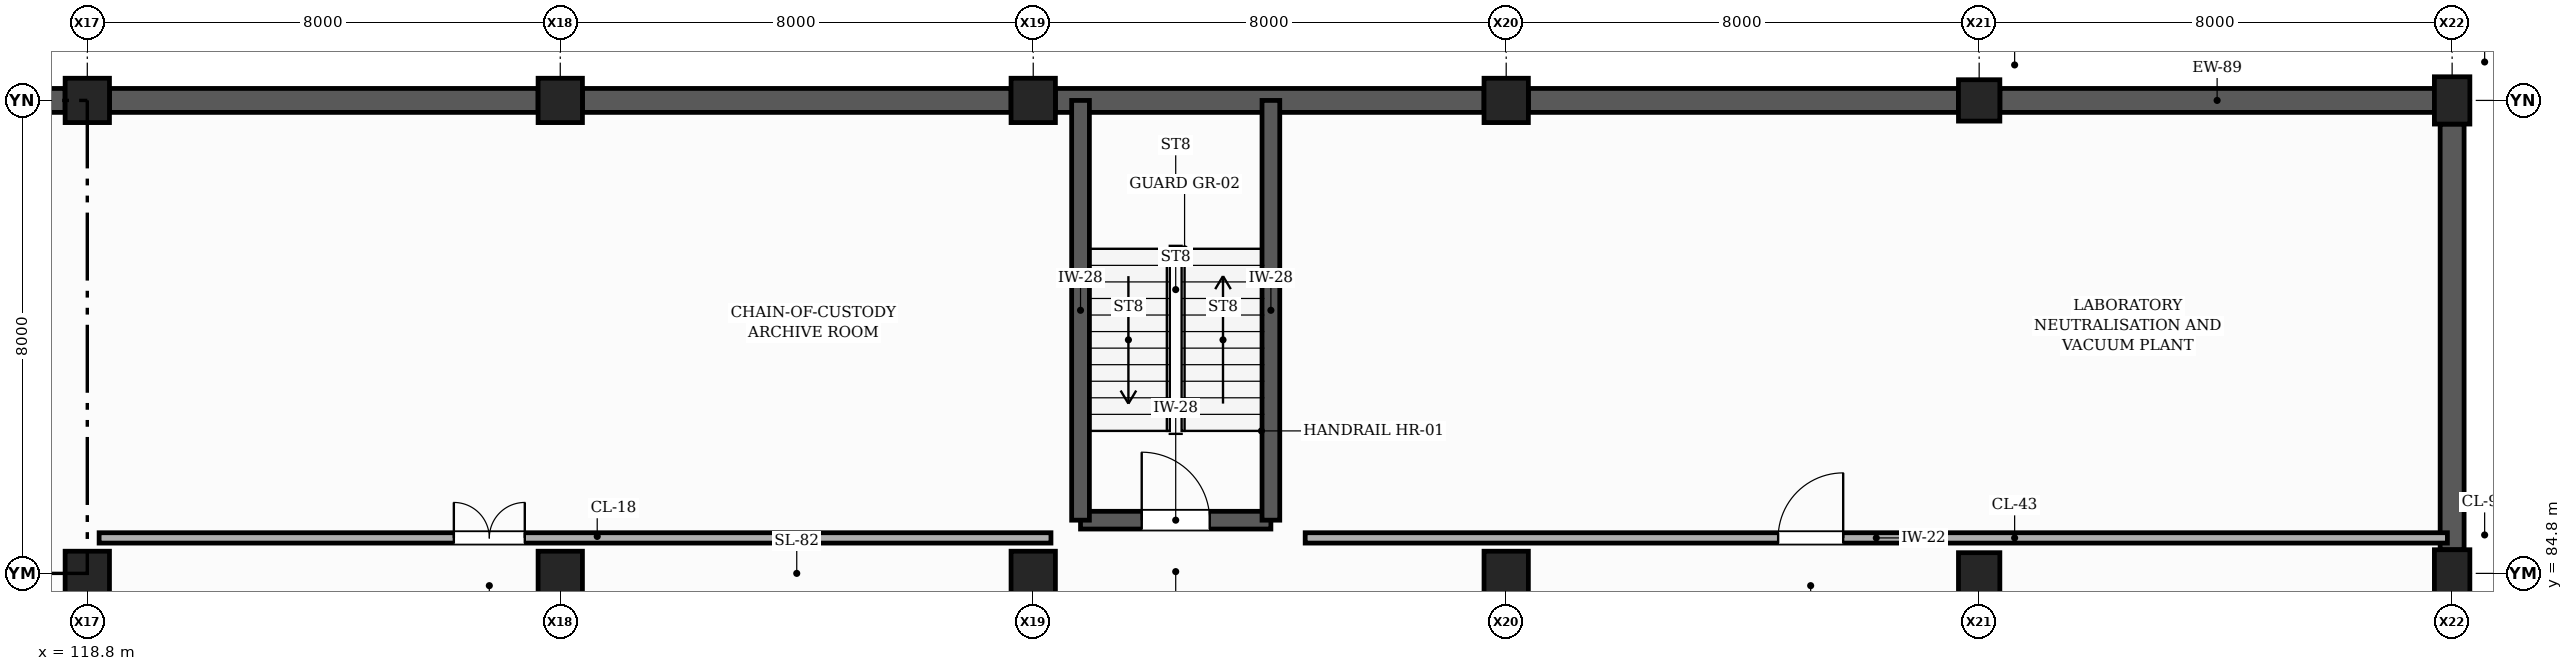
"""IFC4 building model, lengths in metres.
Left out: names, types, materials, properties, quantities, classifications, styles, units other than length and angle.
Written with IfcOpenShell. Run it as: python <this file> out.ifc"""

import sys

from ifc_helpers import new_model, si_unit, direction, frame, frame_2d, origin, origin_2d, place, context, subcontext, project, spatial, rectangle, extrude, element, fill, save


model = new_model("IFC4")
c1 = context("Model", 3, precision=1e-05, world=origin(), true_north=direction((0.0, 1.0)))
c2 = subcontext(c1, "Body", "Model", "MODEL_VIEW")
j1 = project(units=[si_unit("LENGTHUNIT", "METRE"), si_unit("PLANEANGLEUNIT", "RADIAN")], contexts=[c1])
p1 = place(None, origin())
s1 = spatial("IfcSite", under=j1, at=p1, CompositionType="ELEMENT")
p2 = place(p1, origin())
s2 = spatial("IfcBuilding", under=s1, at=p2, CompositionType="ELEMENT")
p3 = place(p2, frame((0.0, 0.0, -4.2)))
s3 = spatial("IfcBuildingStorey", under=s2, at=p3, CompositionType="ELEMENT", Elevation=-4.2)
for number, where, z_axis, x_axis in (
    (1, (118.8, 84.8, -0.52), (0.0, 0.0, 1.0), (1.0, 0.0, 0.0)),
    (2, (118.8, 92.8, -0.52), (0.0, 0.0, 1.0), (1.0, 0.0, 0.0)),
    (3, (126.8, 84.8, -0.52), (0.0, 0.0, 1.0), (1.0, 0.0, 0.0)),
    (4, (126.8, 92.8, -0.52), (0.0, 0.0, 1.0), (1.0, 0.0, 0.0)),
    (5, (134.8, 84.8, -0.52), (0.0, 0.0, 1.0), (1.0, 0.0, 0.0)),
    (6, (134.8, 92.8, -0.52), (0.0, 0.0, 1.0), (1.0, 0.0, 0.0)),
    (7, (142.8, 84.8, -0.52), (0.0, 0.0, 1.0), (1.0, 0.0, 0.0)),
    (8, (142.8, 92.8, -0.52), (0.0, 0.0, 1.0), (1.0, 0.0, 0.0)),
):
    element("IfcColumn", number, at=place(p3, frame(where, z_axis=z_axis, x_axis=x_axis)), inside=s3, PredefinedType="COLUMN", context=c2, shape_type="SweptSolid", body=[
        extrude(rectangle(XDim=0.75, YDim=0.75, at=origin_2d()), origin(), (0.0, 0.0, 1.0), 4.72),
    ])
for number, where, z_axis, x_axis in (
    (9, (150.8, 84.8, -0.52), (0.0, 0.0, 1.0), (1.0, 0.0, 0.0)),
    (10, (150.8, 92.8, -0.52), (0.0, 0.0, 1.0), (1.0, 0.0, 0.0)),
):
    element("IfcColumn", number, at=place(p3, frame(where, z_axis=z_axis, x_axis=x_axis)), inside=s3, PredefinedType="COLUMN", context=c2, shape_type="SweptSolid", body=[
        extrude(rectangle(XDim=0.7, YDim=0.7, at=origin_2d()), origin(), (0.0, 0.0, 1.0), 4.72),
    ])
for number, where, z_axis, x_axis in (
    (11, (158.8, 84.8, -0.52), (0.0, 0.0, 1.0), (1.0, 0.0, 0.0)),
    (12, (158.8, 92.8, -0.52), (0.0, 0.0, 1.0), (1.0, 0.0, 0.0)),
):
    element("IfcColumn", number, at=place(p3, frame(where, z_axis=z_axis, x_axis=x_axis)), inside=s3, PredefinedType="COLUMN", context=c2, shape_type="SweptSolid", body=[
        extrude(rectangle(XDim=0.6, YDim=0.8, at=origin_2d()), origin(), (0.0, 0.0, 1.0), 4.72),
    ])
p4 = place(p3, frame((158.8, 85.2, -0.44), z_axis=(0.0, 0.0, 1.0), x_axis=(0.0, 1.0, 0.0)))
e13 = element("IfcWall", 13, at=p4, inside=s3, PredefinedType="SOLIDWALL", context=c2, shape_type="SweptSolid", body=[
    extrude(rectangle(XDim=7.2, YDim=0.405, at=frame_2d((3.6, 0.0))), origin(), (0.0, 0.0, 1.0), 3.57),
])
p5 = place(p3, frame((158.5, 92.8, -0.44), z_axis=(0.0, 0.0, 1.0), x_axis=(-1.0, 0.0, 0.0)))
e14 = element("IfcWall", 14, at=p5, inside=s3, PredefinedType="SOLIDWALL", context=c2, shape_type="SweptSolid", body=[
    extrude(rectangle(XDim=7.35, YDim=0.405, at=frame_2d((3.675, 0.0))), origin(), (0.0, 0.0, 1.0), 3.47),
])
p6 = place(p3, frame((150.45, 92.8, -0.44), z_axis=(0.0, 0.0, 1.0), x_axis=(-1.0, 0.0, 0.0)))
e15 = element("IfcWall", 15, at=p6, inside=s3, PredefinedType="SOLIDWALL", context=c2, shape_type="SweptSolid", body=[
    extrude(rectangle(XDim=7.275, YDim=0.405, at=frame_2d((3.637, 0.0))), origin(), (0.0, 0.0, 1.0), 3.47),
])
p7 = place(p3, frame((142.425, 92.8, -0.44), z_axis=(0.0, 0.0, 1.0), x_axis=(-1.0, 0.0, 0.0)))
e16 = element("IfcWall", 16, at=p7, inside=s3, PredefinedType="SOLIDWALL", context=c2, shape_type="SweptSolid", body=[
    extrude(rectangle(XDim=7.25, YDim=0.405, at=frame_2d((3.625, 0.0))), origin(), (0.0, 0.0, 1.0), 4.22),
])
for number, where, z_axis, x_axis in (
    (17, (134.425, 92.8, -0.44), (0.0, 0.0, 1.0), (-1.0, 0.0, 0.0)),
    (18, (126.425, 92.8, -0.44), (0.0, 0.0, 1.0), (-1.0, 0.0, 0.0)),
):
    element("IfcWall", number, at=place(p3, frame(where, z_axis=z_axis, x_axis=x_axis)), inside=s3, PredefinedType="SOLIDWALL", context=c2, shape_type="SweptSolid", body=[
        extrude(rectangle(XDim=7.25, YDim=0.405, at=frame_2d((3.625, 0.0))), origin(), (0.0, 0.0, 1.0), 3.47),
    ])
p8 = place(p3, frame((118.425, 92.8, -0.44), z_axis=(0.0, 0.0, 1.0), x_axis=(-1.0, 0.0, 0.0)))
e19 = element("IfcWall", 19, at=p8, inside=s3, PredefinedType="SOLIDWALL", context=c2, shape_type="SweptSolid", body=[
    extrude(rectangle(XDim=7.25, YDim=0.405, at=frame_2d((3.625, 0.0))), origin(), (0.0, 0.0, 1.0), 4.22),
])
p9 = place(p3, frame((135.6, 85.7, -0.52), z_axis=(0.0, 0.0, 1.0), x_axis=(1.0, 0.0, 0.0)))
e20 = element("IfcWall", 20, at=p9, inside=s3, PredefinedType="SHEAR", context=c2, shape_type="SweptSolid", body=[
    extrude(rectangle(XDim=3.22, YDim=0.3, at=frame_2d((1.61, 0.0))), origin(), (0.0, 0.0, 1.0), 4.72),
])
p10 = place(p9, frame((1.035, 0.0, 0.52)))
e21 = element("IfcOpeningElement", 21, at=p10, cuts=e20, PredefinedType="OPENING", context=c2, shape_type="SweptSolid", body=[
    extrude(rectangle(XDim=1.15, YDim=2.15, at=frame_2d((0.575, 1.075))), frame((0.0, 0.16, 0.0), z_axis=(0.0, -1.0, 0.0), x_axis=(1.0, 0.0, 0.0)), (0.0, 0.0, 1.0), 0.32),
])
for number, where, z_axis, x_axis in (
    (22, (138.82, 85.7, -0.52), (0.0, 0.0, 1.0), (0.0, 1.0, 0.0)),
    (23, (135.6, 92.8, -0.52), (0.0, 0.0, 1.0), (0.0, -1.0, 0.0)),
):
    element("IfcWall", number, at=place(p3, frame(where, z_axis=z_axis, x_axis=x_axis)), inside=s3, PredefinedType="SHEAR", context=c2, shape_type="SweptSolid", body=[
        extrude(rectangle(XDim=7.1, YDim=0.3, at=frame_2d((3.55, 0.0))), origin(), (0.0, 0.0, 1.0), 4.72),
    ])
p11 = place(p3, frame((119.0, 85.4, 0.0), z_axis=(0.0, 0.0, 1.0), x_axis=(1.0, 0.0, 0.0)))
e24 = element("IfcWall", 24, at=p11, inside=s3, PredefinedType="PARTITIONING", context=c2, shape_type="SweptSolid", body=[
    extrude(rectangle(XDim=16.1, YDim=0.175, at=frame_2d((8.05, 0.0))), origin(), (0.0, 0.0, 1.0), 3.015),
])
p12 = place(p11, frame((6.0, 0.0, 0.0)))
e25 = element("IfcOpeningElement", 25, at=p12, cuts=e24, PredefinedType="OPENING", context=c2, shape_type="SweptSolid", body=[
    extrude(rectangle(XDim=1.2, YDim=2.15, at=frame_2d((0.6, 1.075))), frame((0.0, 0.098, 0.0), z_axis=(0.0, -1.0, 0.0), x_axis=(1.0, 0.0, 0.0)), (0.0, 0.0, 1.0), 0.195),
])
p13 = place(p3, frame((139.4, 85.4, 0.0), z_axis=(0.0, 0.0, 1.0), x_axis=(1.0, 0.0, 0.0)))
e26 = element("IfcWall", 26, at=p13, inside=s3, PredefinedType="PARTITIONING", context=c2, shape_type="SweptSolid", body=[
    extrude(rectangle(XDim=19.32, YDim=0.175, at=frame_2d((9.66, 0.0))), origin(), (0.0, 0.0, 1.0), 3.015),
])
p14 = place(p13, frame((8.0, 0.0, 0.0)))
e27 = element("IfcOpeningElement", 27, at=p14, cuts=e26, PredefinedType="OPENING", context=c2, shape_type="SweptSolid", body=[
    extrude(rectangle(XDim=1.1, YDim=2.15, at=frame_2d((0.55, 1.075))), frame((0.0, 0.098, 0.0), z_axis=(0.0, -1.0, 0.0), x_axis=(1.0, 0.0, 0.0)), (0.0, 0.0, 1.0), 0.195),
])
p15 = place(p10, origin())
e28 = element("IfcDoor", 28, at=p15, inside=s3, OperationType="SINGLE_SWING_LEFT", PredefinedType="DOOR", context=c2, shape_type="SweptSolid", body=[
    extrude(rectangle(XDim=1.15, YDim=2.15, at=frame_2d((0.575, 1.075))), frame((0.0, 0.025, 0.0), z_axis=(0.0, -1.0, 0.0), x_axis=(1.0, 0.0, 0.0)), (0.0, 0.0, 1.0), 0.05),
])
fill(e21, e28)
p16 = place(p12, origin())
e29 = element("IfcDoor", 29, at=p16, inside=s3, OperationType="DOUBLE_DOOR_SINGLE_SWING", PredefinedType="DOOR", context=c2, shape_type="SweptSolid", body=[
    extrude(rectangle(XDim=1.2, YDim=2.15, at=frame_2d((0.6, 1.075))), frame((0.0, 0.025, 0.0), z_axis=(0.0, -1.0, 0.0), x_axis=(1.0, 0.0, 0.0)), (0.0, 0.0, 1.0), 0.05),
])
fill(e25, e29)
p17 = place(p14, origin())
e30 = element("IfcDoor", 30, at=p17, inside=s3, OperationType="SINGLE_SWING_RIGHT", PredefinedType="DOOR", context=c2, shape_type="SweptSolid", body=[
    extrude(rectangle(XDim=1.1, YDim=2.15, at=frame_2d((0.55, 1.075))), frame((0.0, 0.025, 0.0), z_axis=(0.0, -1.0, 0.0), x_axis=(1.0, 0.0, 0.0)), (0.0, 0.0, 1.0), 0.05),
])
fill(e27, e30)
save(model, sys.argv[1])
